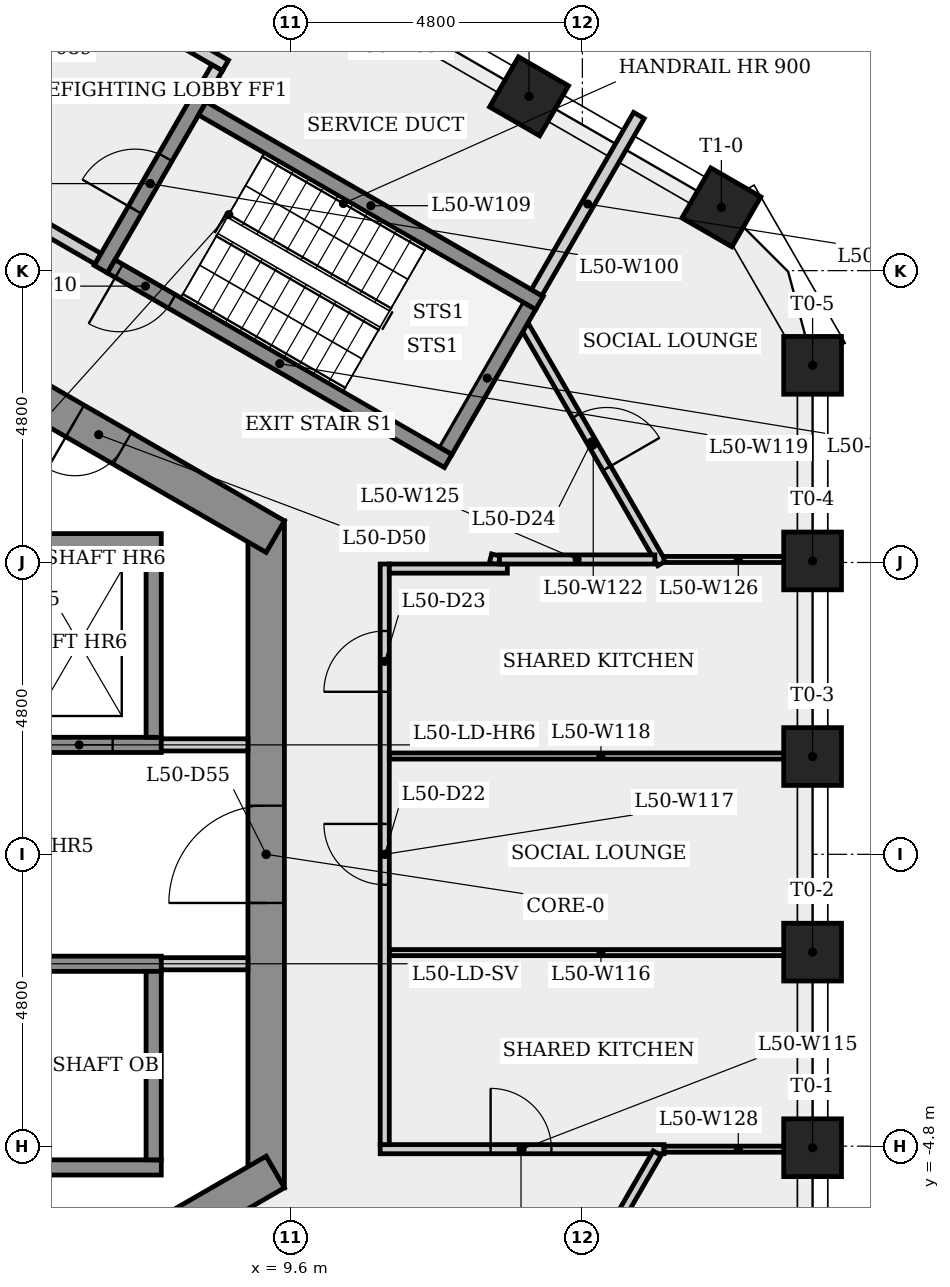
"""IFC4 building model, lengths in metres.
Left out: names, types, materials, properties, quantities, classifications, styles, units other than length and angle.
Written with IfcOpenShell. Run it as: python <this file> out.ifc"""

import sys

from ifc_helpers import new_model, si_unit, direction, frame, frame_2d, origin, origin_2d, place, context, subcontext, project, spatial, rectangle, extrude, element, fill, save


model = new_model("IFC4")
c1 = context("Model", 3, precision=1e-05, world=origin(), true_north=direction((0.0, 1.0)))
c2 = subcontext(c1, "Body", "Model", "MODEL_VIEW")
j1 = project(units=[si_unit("LENGTHUNIT", "METRE"), si_unit("PLANEANGLEUNIT", "RADIAN")], contexts=[c1])
p1 = place(None, origin())
s1 = spatial("IfcSite", under=j1, at=p1, CompositionType="ELEMENT")
p2 = place(p1, origin())
s2 = spatial("IfcBuilding", under=s1, at=p2, CompositionType="ELEMENT")
p3 = place(p2, frame((0.0, 0.0, 186.7)))
s3 = spatial("IfcBuildingStorey", under=s2, at=p3, CompositionType="ELEMENT", Elevation=186.7)
p4 = place(p3, frame((9.2, -5.485, 0.0), z_axis=(0.0, 0.0, 1.0), x_axis=(0.0, 1.0, 0.0)))
e1 = element("IfcWall", 1, at=p4, inside=s3, PredefinedType="SHEAR", context=c2, shape_type="SweptSolid", body=[
    extrude(rectangle(XDim=10.97, YDim=0.6, at=frame_2d((5.485, 0.0))), origin(), (0.0, 0.0, 1.0), 4.0),
])
p5 = place(p4, frame((4.685, 0.0, 0.0)))
e2 = element("IfcOpeningElement", 2, at=p5, cuts=e1, PredefinedType="OPENING", context=c2, shape_type="SweptSolid", body=[
    extrude(rectangle(XDim=1.6, YDim=2.1, at=frame_2d((0.8, 1.05))), frame((0.0, 0.31, 0.0), z_axis=(0.0, -1.0, 0.0), x_axis=(1.0, 0.0, 0.0)), (0.0, 0.0, 1.0), 0.62),
])
p6 = place(p3, frame((9.35, 5.225, 0.0), z_axis=(0.0, 0.0, 1.0), x_axis=(-0.866023993627, 0.500002442456, 0.0)))
e3 = element("IfcWall", 3, at=p6, inside=s3, PredefinedType="SHEAR", context=c2, shape_type="SweptSolid", body=[
    extrude(rectangle(XDim=10.97, YDim=0.6, at=frame_2d((5.485, 0.0))), origin(), (0.0, 0.0, 1.0), 4.0),
])
p7 = place(p6, frame((2.904, 0.0, 0.0)))
e4 = element("IfcOpeningElement", 4, at=p7, cuts=e3, PredefinedType="OPENING", context=c2, shape_type="SweptSolid", body=[
    extrude(rectangle(XDim=0.9, YDim=2.1, at=frame_2d((0.45, 1.05))), frame((0.0, 0.31, 0.0), z_axis=(0.0, -1.0, 0.0), x_axis=(1.0, 0.0, 0.0)), (0.0, 0.0, 1.0), 0.62),
])
p8 = place(p3, frame((-0.15, -10.71, 0.0), z_axis=(0.0, 0.0, 1.0), x_axis=(0.866023993627, 0.500002442456, 0.0)))
e5 = element("IfcWall", 5, at=p8, inside=s3, PredefinedType="SHEAR", context=c2, shape_type="SweptSolid", body=[
    extrude(rectangle(XDim=10.97, YDim=0.6, at=frame_2d((5.485, 0.0))), origin(), (0.0, 0.0, 1.0), 4.0),
])
p9 = place(p8, frame((7.628, 0.0, 0.0)))
e6 = element("IfcOpeningElement", 6, at=p9, cuts=e5, PredefinedType="OPENING", context=c2, shape_type="SweptSolid", body=[
    extrude(rectangle(XDim=0.9, YDim=2.1, at=frame_2d((0.45, 1.05))), frame((0.0, 0.31, 0.0), z_axis=(0.0, -1.0, 0.0), x_axis=(1.0, 0.0, 0.0)), (0.0, 0.0, 1.0), 0.62),
])
for number, where, z_axis, x_axis in (
    (7, (18.187, -4.825, 0.0), (0.0, 0.0, 1.0), (1.0, 0.0, 0.0)),
    (8, (18.187, -1.608, 0.0), (0.0, 0.0, 1.0), (1.0, 0.0, 0.0)),
    (9, (18.187, 1.608, 0.0), (0.0, 0.0, 1.0), (1.0, 0.0, 0.0)),
    (10, (18.187, 4.825, 0.0), (0.0, 0.0, 1.0), (1.0, 0.0, 0.0)),
    (11, (18.187, 8.042, 0.0), (0.0, 0.0, 1.0), (1.0, 0.0, 0.0)),
    (12, (16.687, 10.64, 0.0), (0.0, 0.0, 1.0), (0.5, 0.866, 0.0)),
    (13, (13.523, 12.467, 0.0), (0.0, 0.0, 1.0), (0.5, 0.866, 0.0)),
):
    element("IfcColumn", number, at=place(p3, frame(where, z_axis=z_axis, x_axis=x_axis)), inside=s3, PredefinedType="COLUMN", context=c2, shape_type="SweptSolid", body=[
        extrude(rectangle(XDim=0.95, YDim=0.95, at=origin_2d()), origin(), (0.0, 0.0, 1.0), 4.0),
    ])
p10 = place(p3, frame((-7.475, 1.8, 0.0), z_axis=(0.0, 0.0, 1.0), x_axis=(1.0, 0.0, 0.0)))
e14 = element("IfcWall", 14, at=p10, inside=s3, PredefinedType="SHEAR", context=c2, shape_type="SweptSolid", body=[
    extrude(rectangle(XDim=14.95, YDim=0.25, at=frame_2d((7.475, 0.0))), origin(), (0.0, 0.0, 1.0), 3.6),
])
p11 = place(p10, frame((0.8, 0.0, 0.0)))
e15 = element("IfcOpeningElement", 15, at=p11, cuts=e14, PredefinedType="OPENING", context=c2, shape_type="SweptSolid", body=[
    extrude(rectangle(XDim=1.1, YDim=2.1, at=frame_2d((0.55, 1.05))), frame((0.0, 0.135, 0.0), z_axis=(0.0, -1.0, 0.0), x_axis=(1.0, 0.0, 0.0)), (0.0, 0.0, 1.0), 0.27),
])
p12 = place(p10, frame((3.25, 0.0, 0.0)))
e16 = element("IfcOpeningElement", 16, at=p12, cuts=e14, PredefinedType="OPENING", context=c2, shape_type="SweptSolid", body=[
    extrude(rectangle(XDim=1.1, YDim=2.1, at=frame_2d((0.55, 1.05))), frame((0.0, 0.135, 0.0), z_axis=(0.0, -1.0, 0.0), x_axis=(1.0, 0.0, 0.0)), (0.0, 0.0, 1.0), 0.27),
])
p13 = place(p10, frame((5.7, 0.0, 0.0)))
e17 = element("IfcOpeningElement", 17, at=p13, cuts=e14, PredefinedType="OPENING", context=c2, shape_type="SweptSolid", body=[
    extrude(rectangle(XDim=1.1, YDim=2.1, at=frame_2d((0.55, 1.05))), frame((0.0, 0.135, 0.0), z_axis=(0.0, -1.0, 0.0), x_axis=(1.0, 0.0, 0.0)), (0.0, 0.0, 1.0), 0.27),
])
p14 = place(p10, frame((8.15, 0.0, 0.0)))
e18 = element("IfcOpeningElement", 18, at=p14, cuts=e14, PredefinedType="OPENING", context=c2, shape_type="SweptSolid", body=[
    extrude(rectangle(XDim=1.1, YDim=2.1, at=frame_2d((0.55, 1.05))), frame((0.0, 0.135, 0.0), z_axis=(0.0, -1.0, 0.0), x_axis=(1.0, 0.0, 0.0)), (0.0, 0.0, 1.0), 0.27),
])
p15 = place(p10, frame((10.6, 0.0, 0.0)))
e19 = element("IfcOpeningElement", 19, at=p15, cuts=e14, PredefinedType="OPENING", context=c2, shape_type="SweptSolid", body=[
    extrude(rectangle(XDim=1.1, YDim=2.1, at=frame_2d((0.55, 1.05))), frame((0.0, 0.135, 0.0), z_axis=(0.0, -1.0, 0.0), x_axis=(1.0, 0.0, 0.0)), (0.0, 0.0, 1.0), 0.27),
])
p16 = place(p10, frame((13.05, 0.0, 0.0)))
e20 = element("IfcOpeningElement", 20, at=p16, cuts=e14, PredefinedType="OPENING", context=c2, shape_type="SweptSolid", body=[
    extrude(rectangle(XDim=1.1, YDim=2.1, at=frame_2d((0.55, 1.05))), frame((0.0, 0.135, 0.0), z_axis=(0.0, -1.0, 0.0), x_axis=(1.0, 0.0, 0.0)), (0.0, 0.0, 1.0), 0.27),
])
p17 = place(p3, frame((-7.225, 5.15, 0.0), z_axis=(0.0, 0.0, 1.0), x_axis=(1.0, 0.0, 0.0)))
e21 = element("IfcWall", 21, at=p17, inside=s3, PredefinedType="SHEAR", context=c2, shape_type="SweptSolid", body=[
    extrude(rectangle(XDim=14.7, YDim=0.25, at=frame_2d((7.35, 0.0))), origin(), (0.0, 0.0, 1.0), 3.6),
])
p18 = place(p3, frame((4.459, 15.323, 0.0), z_axis=(0.0, 0.0, 1.0), x_axis=(0.866016039709, -0.500016218704, 0.0)))
e22 = element("IfcWall", 22, at=p18, inside=s3, PredefinedType="PLUMBINGWALL", context=c2, shape_type="SweptSolid", body=[
    extrude(rectangle(XDim=4.7, YDim=0.2, at=frame_2d((2.35, 0.0))), origin(), (0.0, 0.0, 1.0), 3.6),
])
p19 = place(p3, frame((2.575, -5.15, 0.0), z_axis=(0.0, 0.0, 1.0), x_axis=(1.0, 0.0, 0.0)))
e23 = element("IfcWall", 23, at=p19, inside=s3, PredefinedType="SHEAR", context=c2, shape_type="SweptSolid", body=[
    extrude(rectangle(XDim=4.9, YDim=0.25, at=frame_2d((2.45, 0.0))), origin(), (0.0, 0.0, 1.0), 3.6),
])
p20 = place(p3, frame((2.575, -1.8, 0.0), z_axis=(0.0, 0.0, 1.0), x_axis=(1.0, 0.0, 0.0)))
e24 = element("IfcWall", 24, at=p20, inside=s3, PredefinedType="SHEAR", context=c2, shape_type="SweptSolid", body=[
    extrude(rectangle(XDim=4.9, YDim=0.25, at=frame_2d((2.45, 0.0))), origin(), (0.0, 0.0, 1.0), 3.6),
])
p21 = place(p20, frame((0.597, 0.0, 0.0)))
e25 = element("IfcOpeningElement", 25, at=p21, cuts=e24, PredefinedType="OPENING", context=c2, shape_type="SweptSolid", body=[
    extrude(rectangle(XDim=1.1, YDim=2.1, at=frame_2d((0.55, 1.05))), frame((0.0, 0.135, 0.0), z_axis=(0.0, -1.0, 0.0), x_axis=(1.0, 0.0, 0.0)), (0.0, 0.0, 1.0), 0.27),
])
p22 = place(p3, frame((6.435, 9.795, 0.0), z_axis=(0.0, 0.0, 1.0), x_axis=(-0.866012907634, 0.500021643343, 0.0)))
e26 = element("IfcWall", 26, at=p22, inside=s3, PredefinedType="PARTITIONING", context=c2, shape_type="SweptSolid", body=[
    extrude(rectangle(XDim=4.45, YDim=0.2, at=frame_2d((2.225, 0.0))), origin(), (0.0, 0.0, 1.0), 3.6),
])
p23 = place(p22, frame((1.675, 0.0, 0.0)))
e27 = element("IfcOpeningElement", 27, at=p23, cuts=e26, PredefinedType="OPENING", context=c2, shape_type="SweptSolid", body=[
    extrude(rectangle(XDim=1.1, YDim=2.1, at=frame_2d((0.55, 1.05))), frame((0.0, 0.11, 0.0), z_axis=(0.0, -1.0, 0.0), x_axis=(1.0, 0.0, 0.0)), (0.0, 0.0, 1.0), 0.22),
])
p24 = place(p3, frame((6.48, 9.624, 0.0), z_axis=(0.0, 0.0, 1.0), x_axis=(0.500017246033, 0.866015446554, 0.0)))
e28 = element("IfcWall", 28, at=p24, inside=s3, PredefinedType="SHEAR", context=c2, shape_type="SweptSolid", body=[
    extrude(rectangle(XDim=3.25, YDim=0.25, at=frame_2d((1.625, 0.0))), origin(), (0.0, 0.0, 1.0), 3.6),
])
p25 = place(p24, frame((1.125, 0.0, 0.0)))
e29 = element("IfcOpeningElement", 29, at=p25, cuts=e28, PredefinedType="OPENING", context=c2, shape_type="SweptSolid", body=[
    extrude(rectangle(XDim=1.0, YDim=2.1, at=frame_2d((0.5, 1.05))), frame((0.0, 0.135, 0.0), z_axis=(0.0, -1.0, 0.0), x_axis=(1.0, 0.0, 0.0)), (0.0, 0.0, 1.0), 0.27),
])
p26 = place(p3, frame((7.475, 1.8, 0.0), z_axis=(0.0, 0.0, 1.0), x_axis=(1.0, 0.0, 0.0)))
e30 = element("IfcWall", 30, at=p26, inside=s3, PredefinedType="PARTITIONING", context=c2, shape_type="SweptSolid", body=[
    extrude(rectangle(XDim=1.425, YDim=0.2, at=frame_2d((0.712, 0.0))), origin(), (0.0, 0.0, 1.0), 3.6),
])
for number, where, z_axis, x_axis in (
    (31, (7.35, -1.925, 0.0), (0.0, 0.0, 1.0), (0.0, -1.0, 0.0)),
    (32, (7.35, 5.025, 0.0), (0.0, 0.0, 1.0), (0.0, -1.0, 0.0)),
):
    element("IfcWall", number, at=place(p3, frame(where, z_axis=z_axis, x_axis=x_axis)), inside=s3, PredefinedType="SHEAR", context=c2, shape_type="SweptSolid", body=[
        extrude(rectangle(XDim=3.1, YDim=0.25, at=frame_2d((1.55, 0.0))), origin(), (0.0, 0.0, 1.0), 4.0),
    ])
p27 = place(p3, frame((8.151, 12.268, 0.0), z_axis=(0.0, 0.0, 1.0), x_axis=(0.866025499775, -0.499999833739, 0.0)))
e33 = element("IfcWall", 33, at=p27, inside=s3, PredefinedType="SHEAR", context=c2, shape_type="SweptSolid", body=[
    extrude(rectangle(XDim=6.4, YDim=0.25, at=frame_2d((3.2, 0.0))), origin(), (0.0, 0.0, 1.0), 3.6),
])
p28 = place(p3, frame((8.393, 12.937, 0.0), z_axis=(0.0, 0.0, 1.0), x_axis=(-0.500065409566, -0.86598763626, 0.0)))
e34 = element("IfcWall", 34, at=p28, inside=s3, PredefinedType="PLUMBINGWALL", context=c2, shape_type="SweptSolid", body=[
    extrude(rectangle(XDim=0.575, YDim=0.2, at=frame_2d((0.288, 0.0))), origin(), (0.0, 0.0, 1.0), 3.6),
])
p29 = place(p3, frame((8.9, -1.8, 0.0), z_axis=(0.0, 0.0, 1.0), x_axis=(-1.0, 0.0, 0.0)))
e35 = element("IfcWall", 35, at=p29, inside=s3, PredefinedType="PARTITIONING", context=c2, shape_type="SweptSolid", body=[
    extrude(rectangle(XDim=1.425, YDim=0.2, at=frame_2d((0.712, 0.0))), origin(), (0.0, 0.0, 1.0), 3.6),
])
p30 = place(p3, frame((11.075, -4.85, 0.0), z_axis=(0.0, 0.0, 1.0), x_axis=(1.0, 0.0, 0.0)))
e36 = element("IfcWall", 36, at=p30, inside=s3, PredefinedType="PARTITIONING", context=c2, shape_type="SweptSolid", body=[
    extrude(rectangle(XDim=4.667, YDim=0.15, at=frame_2d((2.334, 0.0))), origin(), (0.0, 0.0, 1.0), 3.6),
])
p31 = place(p30, frame((1.816, 0.0, 0.0)))
e37 = element("IfcOpeningElement", 37, at=p31, cuts=e36, PredefinedType="OPENING", context=c2, shape_type="SweptSolid", body=[
    extrude(rectangle(XDim=1.0, YDim=2.1, at=frame_2d((0.5, 1.05))), frame((0.0, 0.085, 0.0), z_axis=(0.0, -1.0, 0.0), x_axis=(1.0, 0.0, 0.0)), (0.0, 0.0, 1.0), 0.17),
])
p32 = place(p3, frame((11.225, -1.616, 0.0), z_axis=(0.0, 0.0, 1.0), x_axis=(1.0, 0.0, 0.0)))
e38 = element("IfcWall", 38, at=p32, inside=s3, PredefinedType="PARTITIONING", context=c2, shape_type="SweptSolid", body=[
    extrude(rectangle(XDim=6.961, YDim=0.1, at=frame_2d((3.481, 0.0))), origin(), (0.0, 0.0, 1.0), 3.6),
])
p33 = place(p3, frame((11.15, -4.775, 0.0), z_axis=(0.0, 0.0, 1.0), x_axis=(0.0, 1.0, 0.0)))
e39 = element("IfcWall", 39, at=p33, inside=s3, PredefinedType="PARTITIONING", context=c2, shape_type="SweptSolid", body=[
    extrude(rectangle(XDim=9.549, YDim=0.15, at=frame_2d((4.775, 0.0))), origin(), (0.0, 0.0, 1.0), 3.6),
])
p34 = place(p33, frame((4.275, 0.0, 0.0)))
e40 = element("IfcOpeningElement", 40, at=p34, cuts=e39, PredefinedType="OPENING", context=c2, shape_type="SweptSolid", body=[
    extrude(rectangle(XDim=1.0, YDim=2.1, at=frame_2d((0.5, 1.05))), frame((0.0, 0.085, 0.0), z_axis=(0.0, -1.0, 0.0), x_axis=(1.0, 0.0, 0.0)), (0.0, 0.0, 1.0), 0.17),
])
p35 = place(p33, frame((7.448, 0.0, 0.0)))
e41 = element("IfcOpeningElement", 41, at=p35, cuts=e39, PredefinedType="OPENING", context=c2, shape_type="SweptSolid", body=[
    extrude(rectangle(XDim=1.0, YDim=2.1, at=frame_2d((0.5, 1.05))), frame((0.0, 0.085, 0.0), z_axis=(0.0, -1.0, 0.0), x_axis=(1.0, 0.0, 0.0)), (0.0, 0.0, 1.0), 0.17),
])
p36 = place(p3, frame((11.225, 1.616, 0.0), z_axis=(0.0, 0.0, 1.0), x_axis=(1.0, 0.0, 0.0)))
e42 = element("IfcWall", 42, at=p36, inside=s3, PredefinedType="PARTITIONING", context=c2, shape_type="SweptSolid", body=[
    extrude(rectangle(XDim=6.961, YDim=0.1, at=frame_2d((3.481, 0.0))), origin(), (0.0, 0.0, 1.0), 3.6),
])
p37 = place(p3, frame((12.194, 6.47, 0.0), z_axis=(0.0, 0.0, 1.0), x_axis=(-0.866025499775, 0.499999833739, 0.0)))
e43 = element("IfcWall", 43, at=p37, inside=s3, PredefinedType="SHEAR", context=c2, shape_type="SweptSolid", body=[
    extrude(rectangle(XDim=6.4, YDim=0.25, at=frame_2d((3.2, 0.0))), origin(), (0.0, 0.0, 1.0), 3.6),
])
p38 = place(p37, frame((5.25, 0.0, 0.0)))
e44 = element("IfcOpeningElement", 44, at=p38, cuts=e43, PredefinedType="OPENING", context=c2, shape_type="SweptSolid", body=[
    extrude(rectangle(XDim=1.0, YDim=2.1, at=frame_2d((0.5, 1.05))), frame((0.0, 0.135, 0.0), z_axis=(0.0, -1.0, 0.0), x_axis=(1.0, 0.0, 0.0)), (0.0, 0.0, 1.0), 0.27),
])
p39 = place(p3, frame((12.89, 4.868, 0.0), z_axis=(0.0, 0.0, 1.0), x_axis=(0.96886718516, -0.247581052426, 0.0)))
e45 = element("IfcWall", 45, at=p39, inside=s3, PredefinedType="PARTITIONING", context=c2, shape_type="SweptSolid", body=[
    extrude(rectangle(XDim=0.148, YDim=0.15, at=frame_2d((0.074, 0.0))), origin(), (0.0, 0.0, 1.0), 3.6),
])
p40 = place(p3, frame((13.167, 4.7, 0.0), z_axis=(0.0, 0.0, 1.0), x_axis=(-1.0, 0.0, 0.0)))
e46 = element("IfcWall", 46, at=p40, inside=s3, PredefinedType="PARTITIONING", context=c2, shape_type="SweptSolid", body=[
    extrude(rectangle(XDim=1.941, YDim=0.15, at=frame_2d((0.971, 0.0))), origin(), (0.0, 0.0, 1.0), 3.6),
])
p41 = place(p3, frame((13.453, 8.685, 0.0), z_axis=(0.0, 0.0, 1.0), x_axis=(0.50001024923, -0.866019486308, 0.0)))
e47 = element("IfcWall", 47, at=p41, inside=s3, PredefinedType="PARTITIONING", context=c2, shape_type="SweptSolid", body=[
    extrude(rectangle(XDim=4.504, YDim=0.15, at=frame_2d((2.252, 0.0))), origin(), (0.0, 0.0, 1.0), 3.6),
])
p42 = place(p41, frame((1.697, 0.0, 0.0)))
e48 = element("IfcOpeningElement", 48, at=p42, cuts=e47, PredefinedType="OPENING", context=c2, shape_type="SweptSolid", body=[
    extrude(rectangle(XDim=1.0, YDim=2.1, at=frame_2d((0.5, 1.05))), frame((0.0, 0.085, 0.0), z_axis=(0.0, -1.0, 0.0), x_axis=(1.0, 0.0, 0.0)), (0.0, 0.0, 1.0), 0.17),
])
p43 = place(p3, frame((12.148, 6.641, 0.0), z_axis=(0.0, 0.0, 1.0), x_axis=(0.500034990121, 0.866005201286, 0.0)))
e49 = element("IfcWall", 49, at=p43, inside=s3, PredefinedType="SHEAR", context=c2, shape_type="SweptSolid", body=[
    extrude(rectangle(XDim=2.75, YDim=0.25, at=frame_2d((1.375, 0.0))), origin(), (0.0, 0.0, 1.0), 3.6),
])
p44 = place(p3, frame((15.33, 12.152, 0.0), z_axis=(0.0, 0.0, 1.0), x_axis=(-0.499971653852, -0.866041768822, 0.0)))
e50 = element("IfcWall", 50, at=p44, inside=s3, PredefinedType="PLUMBINGWALL", context=c2, shape_type="SweptSolid", body=[
    extrude(rectangle(XDim=3.364, YDim=0.2, at=frame_2d((1.682, 0.0))), origin(), (0.0, 0.0, 1.0), 3.6),
])
p45 = place(p3, frame((15.593, 4.85, 0.0), z_axis=(0.0, 0.0, 1.0), x_axis=(-1.0, 0.0, 0.0)))
e51 = element("IfcWall", 51, at=p45, inside=s3, PredefinedType="PARTITIONING", context=c2, shape_type="SweptSolid", body=[
    extrude(rectangle(XDim=2.555, YDim=0.15, at=frame_2d((1.278, 0.0))), origin(), (0.0, 0.0, 1.0), 3.6),
])
p46 = place(p3, frame((15.742, 4.85, 0.0), z_axis=(0.0, 0.0, 1.0), x_axis=(1.0, 0.0, 0.0)))
e52 = element("IfcWall", 52, at=p46, inside=s3, PredefinedType="PARTITIONING", context=c2, shape_type="SweptSolid", body=[
    extrude(rectangle(XDim=2.444, YDim=0.1, at=frame_2d((1.222, 0.0))), origin(), (0.0, 0.0, 1.0), 3.6),
])
p47 = place(p3, frame((15.63, -4.915, 0.0), z_axis=(0.0, 0.0, 1.0), x_axis=(-0.499989217622, -0.866031628904, 0.0)))
e53 = element("IfcWall", 53, at=p47, inside=s3, PredefinedType="PARTITIONING", context=c2, shape_type="SweptSolid", body=[
    extrude(rectangle(XDim=7.843, YDim=0.15, at=frame_2d((3.921, 0.0))), origin(), (0.0, 0.0, 1.0), 3.6),
])
p48 = place(p47, frame((3.421, 0.0, 0.0)))
e54 = element("IfcOpeningElement", 54, at=p48, cuts=e53, PredefinedType="OPENING", context=c2, shape_type="SweptSolid", body=[
    extrude(rectangle(XDim=1.0, YDim=2.1, at=frame_2d((0.5, 1.05))), frame((0.0, 0.085, 0.0), z_axis=(0.0, -1.0, 0.0), x_axis=(1.0, 0.0, 0.0)), (0.0, 0.0, 1.0), 0.17),
])
p49 = place(p3, frame((18.187, -4.85, 0.0), z_axis=(0.0, 0.0, 1.0), x_axis=(-1.0, 0.0, 0.0)))
e55 = element("IfcWall", 55, at=p49, inside=s3, PredefinedType="PARTITIONING", context=c2, shape_type="SweptSolid", body=[
    extrude(rectangle(XDim=2.444, YDim=0.1, at=frame_2d((1.222, 0.0))), origin(), (0.0, 0.0, 1.0), 3.6),
])
p50 = place(p16, origin())
e56 = element("IfcDoor", 56, at=p50, inside=s3, OperationType="SLIDING_TO_LEFT", PredefinedType="DOOR", context=c2, shape_type="SweptSolid", body=[
    extrude(rectangle(XDim=1.1, YDim=2.1, at=frame_2d((0.55, 1.05))), frame((0.0, 0.025, 0.0), z_axis=(0.0, -1.0, 0.0), x_axis=(1.0, 0.0, 0.0)), (0.0, 0.0, 1.0), 0.05),
])
fill(e20, e56)
p51 = place(p38, origin())
e57 = element("IfcDoor", 57, at=p51, inside=s3, OperationType="SINGLE_SWING_RIGHT", PredefinedType="DOOR", context=c2, shape_type="SweptSolid", body=[
    extrude(rectangle(XDim=1.0, YDim=2.1, at=frame_2d((0.5, 1.05))), frame((0.0, 0.025, 0.0), z_axis=(0.0, -1.0, 0.0), x_axis=(1.0, 0.0, 0.0)), (0.0, 0.0, 1.0), 0.05),
])
fill(e44, e57)
p52 = place(p25, origin())
e58 = element("IfcDoor", 58, at=p52, inside=s3, OperationType="SINGLE_SWING_LEFT", PredefinedType="DOOR", context=c2, shape_type="SweptSolid", body=[
    extrude(rectangle(XDim=1.0, YDim=2.1, at=frame_2d((0.5, 1.05))), frame((0.0, 0.025, 0.0), z_axis=(0.0, -1.0, 0.0), x_axis=(1.0, 0.0, 0.0)), (0.0, 0.0, 1.0), 0.05),
])
fill(e29, e58)
p53 = place(p31, origin())
e59 = element("IfcDoor", 59, at=p53, inside=s3, OperationType="SINGLE_SWING_LEFT", PredefinedType="DOOR", context=c2, shape_type="SweptSolid", body=[
    extrude(rectangle(XDim=1.0, YDim=2.1, at=frame_2d((0.5, 1.05))), frame((0.0, 0.025, 0.0), z_axis=(0.0, -1.0, 0.0), x_axis=(1.0, 0.0, 0.0)), (0.0, 0.0, 1.0), 0.05),
])
fill(e37, e59)
p54 = place(p34, origin())
e60 = element("IfcDoor", 60, at=p54, inside=s3, OperationType="SINGLE_SWING_RIGHT", PredefinedType="DOOR", context=c2, shape_type="SweptSolid", body=[
    extrude(rectangle(XDim=1.0, YDim=2.1, at=frame_2d((0.5, 1.05))), frame((0.0, 0.025, 0.0), z_axis=(0.0, -1.0, 0.0), x_axis=(1.0, 0.0, 0.0)), (0.0, 0.0, 1.0), 0.05),
])
fill(e40, e60)
p55 = place(p35, origin())
e61 = element("IfcDoor", 61, at=p55, inside=s3, OperationType="SINGLE_SWING_LEFT", PredefinedType="DOOR", context=c2, shape_type="SweptSolid", body=[
    extrude(rectangle(XDim=1.0, YDim=2.1, at=frame_2d((0.5, 1.05))), frame((0.0, 0.025, 0.0), z_axis=(0.0, -1.0, 0.0), x_axis=(1.0, 0.0, 0.0)), (0.0, 0.0, 1.0), 0.05),
])
fill(e41, e61)
p56 = place(p42, origin())
e62 = element("IfcDoor", 62, at=p56, inside=s3, OperationType="SINGLE_SWING_RIGHT", PredefinedType="DOOR", context=c2, shape_type="SweptSolid", body=[
    extrude(rectangle(XDim=1.0, YDim=2.1, at=frame_2d((0.5, 1.05))), frame((0.0, 0.025, 0.0), z_axis=(0.0, -1.0, 0.0), x_axis=(1.0, 0.0, 0.0)), (0.0, 0.0, 1.0), 0.05),
])
fill(e48, e62)
p57 = place(p7, origin())
e63 = element("IfcDoor", 63, at=p57, inside=s3, OperationType="SINGLE_SWING_RIGHT", PredefinedType="DOOR", context=c2, shape_type="SweptSolid", body=[
    extrude(rectangle(XDim=0.9, YDim=2.1, at=frame_2d((0.45, 1.05))), frame((0.0, 0.025, 0.0), z_axis=(0.0, -1.0, 0.0), x_axis=(1.0, 0.0, 0.0)), (0.0, 0.0, 1.0), 0.05),
])
fill(e4, e63)
p58 = place(p5, origin())
e64 = element("IfcDoor", 64, at=p58, inside=s3, OperationType="SINGLE_SWING_LEFT", PredefinedType="DOOR", context=c2, shape_type="SweptSolid", body=[
    extrude(rectangle(XDim=1.6, YDim=2.1, at=frame_2d((0.8, 1.05))), frame((0.0, 0.025, 0.0), z_axis=(0.0, -1.0, 0.0), x_axis=(1.0, 0.0, 0.0)), (0.0, 0.0, 1.0), 0.05),
])
fill(e2, e64)
save(model, sys.argv[1])
